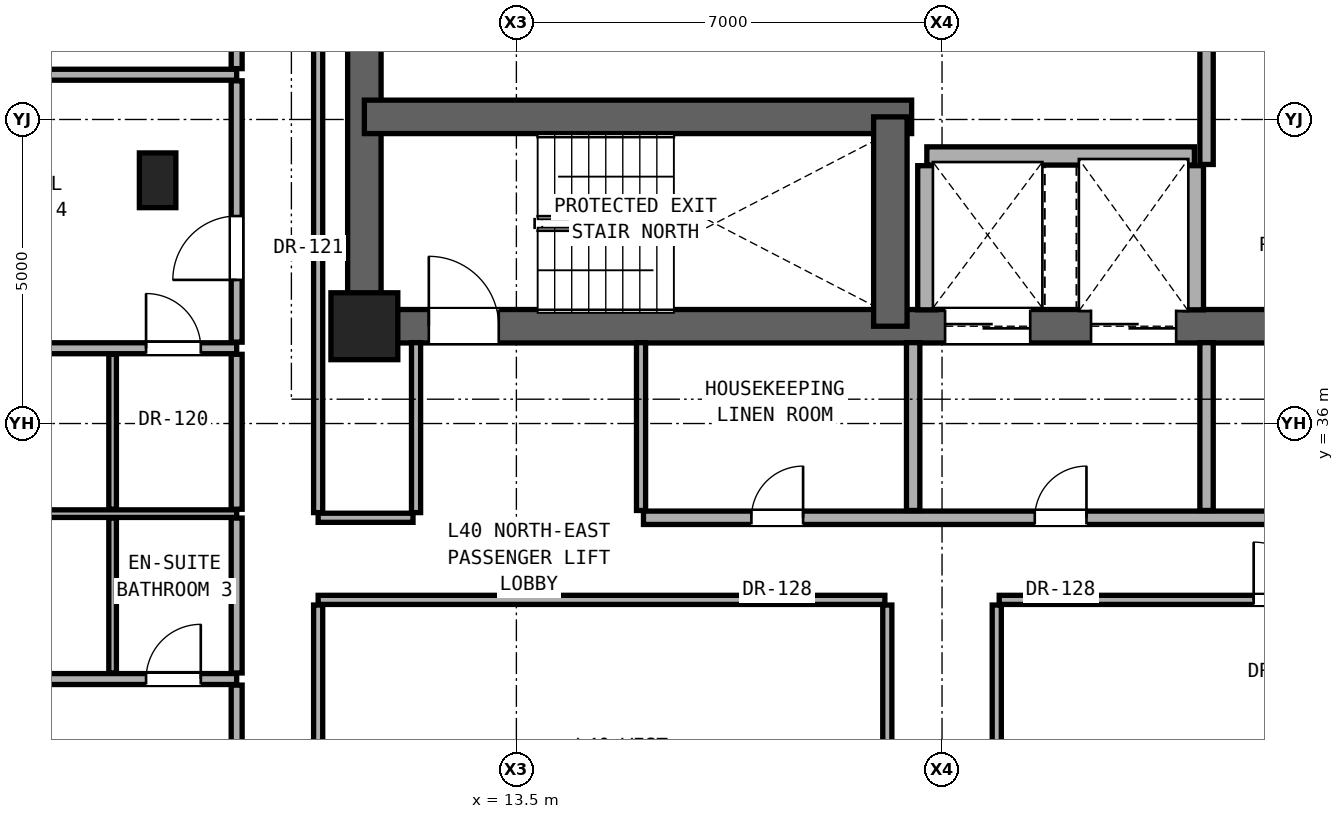
"""IFC4 building model, lengths in metres.
Left out: names, types, materials, properties, quantities, classifications, styles, units other than length and angle.
Written with IfcOpenShell. Run it as: python <this file> out.ifc"""

import sys

from ifc_helpers import new_model, si_unit, direction, frame, frame_2d, origin, origin_2d, place, context, subcontext, project, spatial, rectangle, extrude, element, fill, save


model = new_model("IFC4")
c1 = context("Model", 3, precision=1e-05, world=origin(), true_north=direction((0.0, 1.0)))
c2 = subcontext(c1, "Body", "Model", "MODEL_VIEW")
j1 = project(units=[si_unit("LENGTHUNIT", "METRE"), si_unit("PLANEANGLEUNIT", "RADIAN")], contexts=[c1])
p1 = place(None, origin())
s1 = spatial("IfcSite", under=j1, at=p1, CompositionType="ELEMENT")
p2 = place(p1, origin())
s2 = spatial("IfcBuilding", under=s1, at=p2, CompositionType="ELEMENT")
p3 = place(p2, frame((0.0, 0.0, 141.2)))
s3 = spatial("IfcBuildingStorey", under=s2, at=p3, CompositionType="ELEMENT", Elevation=141.2)
p4 = place(p3, frame((11.0, 37.6, 0.0), z_axis=(0.0, 0.0, 1.0), x_axis=(1.0, 0.0, 0.0)))
e1 = element("IfcColumn", 1, at=p4, inside=s3, PredefinedType="COLUMN", context=c2, shape_type="SweptSolid", body=[
    extrude(rectangle(XDim=1.1, YDim=1.1, at=origin_2d()), origin(), (0.0, 0.0, 1.0), 3.3),
])
p5 = place(p3, frame((7.6, 40.0, 0.0), z_axis=(0.0, 0.0, 1.0), x_axis=(1.0, 0.0, 0.0)))
e2 = element("IfcColumn", 2, at=p5, inside=s3, PredefinedType="PILASTER", context=c2, shape_type="SweptSolid", body=[
    extrude(rectangle(XDim=0.6, YDim=0.9, at=origin_2d()), origin(), (0.0, 0.0, 1.0), 3.3),
])
p6 = place(p3, frame((11.0, 37.6, 0.0), z_axis=(0.0, 0.0, 1.0), x_axis=(0.0, 1.0, 0.0)))
e3 = element("IfcWall", 3, at=p6, inside=s3, PredefinedType="SHEAR", context=c2, shape_type="SweptSolid", body=[
    extrude(rectangle(XDim=6.0, YDim=0.55, at=frame_2d((3.0, 0.0))), origin(), (0.0, 0.0, 1.0), 3.08),
])
p7 = place(p3, frame((11.0, 37.6, 0.0), z_axis=(0.0, 0.0, 1.0), x_axis=(1.0, 0.0, 0.0)))
e4 = element("IfcWall", 4, at=p7, inside=s3, PredefinedType="SHEAR", context=c2, shape_type="SweptSolid", body=[
    extrude(rectangle(XDim=19.0, YDim=0.55, at=frame_2d((9.5, 0.0))), origin(), (0.0, 0.0, 1.0), 3.08),
])
p8 = place(p7, frame((1.06, 0.0, 0.0)))
e5 = element("IfcOpeningElement", 5, at=p8, cuts=e4, PredefinedType="OPENING", context=c2, shape_type="SweptSolid", body=[
    extrude(rectangle(XDim=1.15, YDim=2.2, at=frame_2d((0.575, 1.1))), frame((0.0, 0.285, 0.0), z_axis=(0.0, -1.0, 0.0), x_axis=(1.0, 0.0, 0.0)), (0.0, 0.0, 1.0), 0.57),
])
p9 = place(p7, frame((9.55, 0.0, 0.0)))
e6 = element("IfcOpeningElement", 6, at=p9, cuts=e4, PredefinedType="OPENING", context=c2, shape_type="SweptSolid", body=[
    extrude(rectangle(XDim=1.4, YDim=2.35, at=frame_2d((0.7, 1.175))), frame((0.0, 0.285, 0.0), z_axis=(0.0, -1.0, 0.0), x_axis=(1.0, 0.0, 0.0)), (0.0, 0.0, 1.0), 0.57),
])
p10 = place(p7, frame((11.95, 0.0, 0.0)))
e7 = element("IfcOpeningElement", 7, at=p10, cuts=e4, PredefinedType="OPENING", context=c2, shape_type="SweptSolid", body=[
    extrude(rectangle(XDim=1.4, YDim=2.35, at=frame_2d((0.7, 1.175))), frame((0.0, 0.285, 0.0), z_axis=(0.0, -1.0, 0.0), x_axis=(1.0, 0.0, 0.0)), (0.0, 0.0, 1.0), 0.57),
])
p11 = place(p3, frame((11.0, 41.043, 0.0), z_axis=(0.0, 0.0, 1.0), x_axis=(1.0, 0.0, 0.0)))
e8 = element("IfcWall", 8, at=p11, inside=s3, PredefinedType="SHEAR", context=c2, shape_type="SweptSolid", body=[
    extrude(rectangle(XDim=9.0, YDim=0.55, at=frame_2d((4.5, 0.0))), origin(), (0.0, 0.0, 1.0), 3.08),
])
p12 = place(p3, frame((19.65, 37.6, 0.0), z_axis=(0.0, 0.0, 1.0), x_axis=(0.0, 1.0, 0.0)))
e9 = element("IfcWall", 9, at=p12, inside=s3, PredefinedType="SHEAR", context=c2, shape_type="SweptSolid", body=[
    extrude(rectangle(XDim=3.443, YDim=0.55, at=frame_2d((1.721, 0.0))), origin(), (0.0, 0.0, 1.0), 3.08),
])
p13 = place(p3, frame((-1.34, 31.798, 0.0), z_axis=(0.0, 0.0, 1.0), x_axis=(1.0, 0.0, 0.0)))
e10 = element("IfcWall", 10, at=p13, inside=s3, PredefinedType="PARTITIONING", context=c2, shape_type="SweptSolid", body=[
    extrude(rectangle(XDim=10.24, YDim=0.18, at=frame_2d((5.12, 0.0))), origin(), (0.0, 0.0, 1.0), 2.299),
])
p14 = place(p13, frame((4.245, 0.0, 0.0)))
e11 = element("IfcOpeningElement", 11, at=p14, cuts=e10, PredefinedType="OPENING", context=c2, shape_type="SweptSolid", body=[
    extrude(rectangle(XDim=0.95, YDim=2.15, at=frame_2d((0.475, 1.075))), frame((0.0, 0.1, 0.0), z_axis=(0.0, -1.0, 0.0), x_axis=(1.0, 0.0, 0.0)), (0.0, 0.0, 1.0), 0.2),
])
p15 = place(p13, frame((8.75, 0.0, 0.0)))
e12 = element("IfcOpeningElement", 12, at=p15, cuts=e10, PredefinedType="OPENING", context=c2, shape_type="SweptSolid", body=[
    extrude(rectangle(XDim=0.9, YDim=2.1, at=frame_2d((0.45, 1.05))), frame((0.0, 0.1, 0.0), z_axis=(0.0, -1.0, 0.0), x_axis=(1.0, 0.0, 0.0)), (0.0, 0.0, 1.0), 0.2),
])
p16 = place(p3, frame((10.24, 33.1, 0.0), z_axis=(0.0, 0.0, 1.0), x_axis=(1.0, 0.0, 0.0)))
e13 = element("IfcWall", 13, at=p16, inside=s3, PredefinedType="PARTITIONING", context=c2, shape_type="SweptSolid", body=[
    extrude(rectangle(XDim=9.32, YDim=0.15, at=frame_2d((4.66, 0.0))), origin(), (0.0, 0.0, 1.0), 2.216),
])
p17 = place(p3, frame((21.44, 33.1, 0.0), z_axis=(0.0, 0.0, 1.0), x_axis=(1.0, 0.0, 0.0)))
e14 = element("IfcWall", 14, at=p17, inside=s3, PredefinedType="PARTITIONING", context=c2, shape_type="SweptSolid", body=[
    extrude(rectangle(XDim=9.32, YDim=0.15, at=frame_2d((4.66, 0.0))), origin(), (0.0, 0.0, 1.0), 2.216),
])
p18 = place(p17, frame((4.185, 0.0, 0.0)))
e15 = element("IfcOpeningElement", 15, at=p18, cuts=e14, PredefinedType="OPENING", context=c2, shape_type="SweptSolid", body=[
    extrude(rectangle(XDim=0.95, YDim=2.15, at=frame_2d((0.475, 1.075))), frame((0.0, 0.085, 0.0), z_axis=(0.0, -1.0, 0.0), x_axis=(1.0, 0.0, 0.0)), (0.0, 0.0, 1.0), 0.17),
])
p19 = place(p3, frame((-1.34, 34.518, 0.0), z_axis=(0.0, 0.0, 1.0), x_axis=(1.0, 0.0, 0.0)))
e16 = element("IfcWall", 16, at=p19, inside=s3, PredefinedType="PARTITIONING", context=c2, shape_type="SweptSolid", body=[
    extrude(rectangle(XDim=10.24, YDim=0.125, at=frame_2d((5.12, 0.0))), origin(), (0.0, 0.0, 1.0), 2.299),
])
p20 = place(p3, frame((10.24, 34.45, 0.0), z_axis=(0.0, 0.0, 1.0), x_axis=(1.0, 0.0, 0.0)))
e17 = element("IfcWall", 17, at=p20, inside=s3, PredefinedType="PARTITIONING", context=c2, shape_type="SweptSolid", body=[
    extrude(rectangle(XDim=1.56, YDim=0.15, at=frame_2d((0.78, 0.0))), origin(), (0.0, 0.0, 1.0), 2.216),
])
p21 = place(p3, frame((15.59, 34.45, 0.0), z_axis=(0.0, 0.0, 1.0), x_axis=(1.0, 0.0, 0.0)))
e18 = element("IfcWall", 18, at=p21, inside=s3, PredefinedType="SOLIDWALL", context=c2, shape_type="SweptSolid", body=[
    extrude(rectangle(XDim=15.17, YDim=0.22, at=frame_2d((7.585, 0.0))), origin(), (0.0, 0.0, 1.0), 2.216),
])
p22 = place(p21, frame((6.435, 0.0, 0.0)))
e19 = element("IfcOpeningElement", 19, at=p22, cuts=e18, PredefinedType="OPENING", context=c2, shape_type="SweptSolid", body=[
    extrude(rectangle(XDim=0.85, YDim=2.01, at=frame_2d((0.425, 1.005))), frame((0.0, 0.12, 0.0), z_axis=(0.0, -1.0, 0.0), x_axis=(1.0, 0.0, 0.0)), (0.0, 0.0, 1.0), 0.24),
])
p23 = place(p21, frame((11.085, 0.0, 0.0)))
e20 = element("IfcOpeningElement", 20, at=p23, cuts=e18, PredefinedType="OPENING", context=c2, shape_type="SweptSolid", body=[
    extrude(rectangle(XDim=0.95, YDim=2.15, at=frame_2d((0.475, 1.075))), frame((0.0, 0.12, 0.0), z_axis=(0.0, -1.0, 0.0), x_axis=(1.0, 0.0, 0.0)), (0.0, 0.0, 1.0), 0.24),
])
p24 = place(p21, frame((1.775, 0.0, 0.0)))
e21 = element("IfcOpeningElement", 21, at=p24, cuts=e18, PredefinedType="OPENING", context=c2, shape_type="SweptSolid", body=[
    extrude(rectangle(XDim=0.85, YDim=2.01, at=frame_2d((0.425, 1.005))), frame((0.0, 0.12, 0.0), z_axis=(0.0, -1.0, 0.0), x_axis=(1.0, 0.0, 0.0)), (0.0, 0.0, 1.0), 0.24),
])
p25 = place(p3, frame((-1.34, 37.238, 0.0), z_axis=(0.0, 0.0, 1.0), x_axis=(1.0, 0.0, 0.0)))
e22 = element("IfcWall", 22, at=p25, inside=s3, PredefinedType="PARTITIONING", context=c2, shape_type="SweptSolid", body=[
    extrude(rectangle(XDim=10.24, YDim=0.18, at=frame_2d((5.12, 0.0))), origin(), (0.0, 0.0, 1.0), 2.299),
])
p26 = place(p25, frame((4.245, 0.0, 0.0)))
e23 = element("IfcOpeningElement", 23, at=p26, cuts=e22, PredefinedType="OPENING", context=c2, shape_type="SweptSolid", body=[
    extrude(rectangle(XDim=0.95, YDim=2.15, at=frame_2d((0.475, 1.075))), frame((0.0, 0.1, 0.0), z_axis=(0.0, -1.0, 0.0), x_axis=(1.0, 0.0, 0.0)), (0.0, 0.0, 1.0), 0.2),
])
p27 = place(p25, frame((8.75, 0.0, 0.0)))
e24 = element("IfcOpeningElement", 24, at=p27, cuts=e22, PredefinedType="OPENING", context=c2, shape_type="SweptSolid", body=[
    extrude(rectangle(XDim=0.9, YDim=2.1, at=frame_2d((0.45, 1.05))), frame((0.0, 0.1, 0.0), z_axis=(0.0, -1.0, 0.0), x_axis=(1.0, 0.0, 0.0)), (0.0, 0.0, 1.0), 0.2),
])
p28 = place(p3, frame((20.25, 40.4, 0.0), z_axis=(0.0, 0.0, 1.0), x_axis=(1.0, 0.0, 0.0)))
e25 = element("IfcWall", 25, at=p28, inside=s3, PredefinedType="SOLIDWALL", context=c2, shape_type="SweptSolid", body=[
    extrude(rectangle(XDim=4.4, YDim=0.3, at=frame_2d((2.2, 0.0))), origin(), (0.0, 0.0, 1.0), 3.08),
])
p29 = place(p3, frame((3.95, 41.736, 0.0), z_axis=(0.0, 0.0, 1.0), x_axis=(1.0, 0.0, 0.0)))
e26 = element("IfcWall", 26, at=p29, inside=s3, PredefinedType="PARTITIONING", context=c2, shape_type="SweptSolid", body=[
    extrude(rectangle(XDim=4.95, YDim=0.18, at=frame_2d((2.475, 0.0))), origin(), (0.0, 0.0, 1.0), 3.08),
])
p30 = place(p3, frame((6.86, 31.898, 0.0), z_axis=(0.0, 0.0, 1.0), x_axis=(0.0, 1.0, 0.0)))
e27 = element("IfcWall", 27, at=p30, inside=s3, PredefinedType="PARTITIONING", context=c2, shape_type="SweptSolid", body=[
    extrude(rectangle(XDim=2.548, YDim=0.125, at=frame_2d((1.274, 0.0))), origin(), (0.0, 0.0, 1.0), 3.08),
])
p31 = place(p3, frame((6.86, 34.591, 0.0), z_axis=(0.0, 0.0, 1.0), x_axis=(0.0, 1.0, 0.0)))
e28 = element("IfcWall", 28, at=p31, inside=s3, PredefinedType="PARTITIONING", context=c2, shape_type="SweptSolid", body=[
    extrude(rectangle(XDim=2.547, YDim=0.125, at=frame_2d((1.274, 0.0))), origin(), (0.0, 0.0, 1.0), 3.08),
])
p32 = place(p3, frame((8.9, 27.908, 0.0), z_axis=(0.0, 0.0, 1.0), x_axis=(0.0, 1.0, 0.0)))
e29 = element("IfcWall", 29, at=p32, inside=s3, PredefinedType="PARTITIONING", context=c2, shape_type="SweptSolid", body=[
    extrude(rectangle(XDim=3.79, YDim=0.18, at=frame_2d((1.895, 0.0))), origin(), (0.0, 0.0, 1.0), 2.299),
])
p33 = place(p32, frame((1.37, 0.0, 0.0)))
e30 = element("IfcOpeningElement", 30, at=p33, cuts=e29, PredefinedType="OPENING", context=c2, shape_type="SweptSolid", body=[
    extrude(rectangle(XDim=1.05, YDim=2.2, at=frame_2d((0.525, 1.1))), frame((0.0, 0.1, 0.0), z_axis=(0.0, -1.0, 0.0), x_axis=(1.0, 0.0, 0.0)), (0.0, 0.0, 1.0), 0.2),
])
p34 = place(p3, frame((8.9, 31.898, 0.0), z_axis=(0.0, 0.0, 1.0), x_axis=(0.0, 1.0, 0.0)))
e31 = element("IfcWall", 31, at=p34, inside=s3, PredefinedType="PARTITIONING", context=c2, shape_type="SweptSolid", body=[
    extrude(rectangle(XDim=2.548, YDim=0.18, at=frame_2d((1.274, 0.0))), origin(), (0.0, 0.0, 1.0), 3.08),
])
p35 = place(p3, frame((8.9, 34.591, 0.0), z_axis=(0.0, 0.0, 1.0), x_axis=(0.0, 1.0, 0.0)))
e32 = element("IfcWall", 32, at=p35, inside=s3, PredefinedType="PARTITIONING", context=c2, shape_type="SweptSolid", body=[
    extrude(rectangle(XDim=2.547, YDim=0.18, at=frame_2d((1.274, 0.0))), origin(), (0.0, 0.0, 1.0), 3.08),
])
p36 = place(p3, frame((8.9, 37.338, 0.0), z_axis=(0.0, 0.0, 1.0), x_axis=(0.0, 1.0, 0.0)))
e33 = element("IfcWall", 33, at=p36, inside=s3, PredefinedType="PARTITIONING", context=c2, shape_type="SweptSolid", body=[
    extrude(rectangle(XDim=4.298, YDim=0.18, at=frame_2d((2.149, 0.0))), origin(), (0.0, 0.0, 1.0), 2.456),
])
p37 = place(p36, frame((1.024, 0.0, 0.0)))
e34 = element("IfcOpeningElement", 34, at=p37, cuts=e33, PredefinedType="OPENING", context=c2, shape_type="SweptSolid", body=[
    extrude(rectangle(XDim=1.05, YDim=2.2, at=frame_2d((0.525, 1.1))), frame((0.0, 0.1, 0.0), z_axis=(0.0, -1.0, 0.0), x_axis=(1.0, 0.0, 0.0)), (0.0, 0.0, 1.0), 0.2),
])
p38 = place(p3, frame((8.9, 41.836, 0.0), z_axis=(0.0, 0.0, 1.0), x_axis=(0.0, 1.0, 0.0)))
e35 = element("IfcWall", 35, at=p38, inside=s3, PredefinedType="PARTITIONING", context=c2, shape_type="SweptSolid", body=[
    extrude(rectangle(XDim=5.17, YDim=0.18, at=frame_2d((2.585, 0.0))), origin(), (0.0, 0.0, 1.0), 3.08),
])
p39 = place(p38, frame((2.11, 0.0, 0.0)))
e36 = element("IfcOpeningElement", 36, at=p39, cuts=e35, PredefinedType="OPENING", context=c2, shape_type="SweptSolid", body=[
    extrude(rectangle(XDim=0.95, YDim=2.15, at=frame_2d((0.475, 1.075))), frame((0.0, 0.1, 0.0), z_axis=(0.0, -1.0, 0.0), x_axis=(1.0, 0.0, 0.0)), (0.0, 0.0, 1.0), 0.2),
])
p40 = place(p3, frame((10.24, 27.485, 0.0), z_axis=(0.0, 0.0, 1.0), x_axis=(0.0, 1.0, 0.0)))
e37 = element("IfcWall", 37, at=p40, inside=s3, PredefinedType="PARTITIONING", context=c2, shape_type="SweptSolid", body=[
    extrude(rectangle(XDim=5.53, YDim=0.15, at=frame_2d((2.765, 0.0))), origin(), (0.0, 0.0, 1.0), 2.299),
])
p41 = place(p40, frame((2.29, 0.0, 0.0)))
e38 = element("IfcOpeningElement", 38, at=p41, cuts=e37, PredefinedType="OPENING", context=c2, shape_type="SweptSolid", body=[
    extrude(rectangle(XDim=0.95, YDim=2.15, at=frame_2d((0.475, 1.075))), frame((0.0, 0.085, 0.0), z_axis=(0.0, -1.0, 0.0), x_axis=(1.0, 0.0, 0.0)), (0.0, 0.0, 1.0), 0.17),
])
p42 = place(p3, frame((10.24, 34.535, 0.0), z_axis=(0.0, 0.0, 1.0), x_axis=(0.0, 1.0, 0.0)))
e39 = element("IfcWall", 39, at=p42, inside=s3, PredefinedType="PARTITIONING", context=c2, shape_type="SweptSolid", body=[
    extrude(rectangle(XDim=9.13, YDim=0.15, at=frame_2d((4.565, 0.0))), origin(), (0.0, 0.0, 1.0), 2.456),
])
p43 = place(p3, frame((11.85, 34.535, 0.0), z_axis=(0.0, 0.0, 1.0), x_axis=(0.0, 1.0, 0.0)))
e40 = element("IfcWall", 40, at=p43, inside=s3, PredefinedType="PARTITIONING", context=c2, shape_type="SweptSolid", body=[
    extrude(rectangle(XDim=2.795, YDim=0.15, at=frame_2d((1.397, 0.0))), origin(), (0.0, 0.0, 1.0), 3.08),
])
p44 = place(p3, frame((15.55, 34.57, 0.0), z_axis=(0.0, 0.0, 1.0), x_axis=(0.0, 1.0, 0.0)))
e41 = element("IfcWall", 41, at=p44, inside=s3, PredefinedType="PARTITIONING", context=c2, shape_type="SweptSolid", body=[
    extrude(rectangle(XDim=2.76, YDim=0.15, at=frame_2d((1.38, 0.0))), origin(), (0.0, 0.0, 1.0), 2.609),
])
p45 = place(p3, frame((19.6, 27.485, 0.0), z_axis=(0.0, 0.0, 1.0), x_axis=(0.0, 1.0, 0.0)))
e42 = element("IfcWall", 42, at=p45, inside=s3, PredefinedType="PARTITIONING", context=c2, shape_type="SweptSolid", body=[
    extrude(rectangle(XDim=5.53, YDim=0.15, at=frame_2d((2.765, 0.0))), origin(), (0.0, 0.0, 1.0), 2.216),
])
p46 = place(p3, frame((20.025, 34.57, 0.0), z_axis=(0.0, 0.0, 1.0), x_axis=(0.0, 1.0, 0.0)))
e43 = element("IfcWall", 43, at=p46, inside=s3, PredefinedType="SOLIDWALL", context=c2, shape_type="SweptSolid", body=[
    extrude(rectangle(XDim=2.76, YDim=0.22, at=frame_2d((1.38, 0.0))), origin(), (0.0, 0.0, 1.0), 3.08),
])
p47 = place(p3, frame((20.25, 37.87, 0.0), z_axis=(0.0, 0.0, 1.0), x_axis=(0.0, 1.0, 0.0)))
e44 = element("IfcWall", 44, at=p47, inside=s3, PredefinedType="SOLIDWALL", context=c2, shape_type="SweptSolid", body=[
    extrude(rectangle(XDim=2.37, YDim=0.3, at=frame_2d((1.185, 0.0))), origin(), (0.0, 0.0, 1.0), 3.08),
])
p48 = place(p3, frame((21.4, 27.485, 0.0), z_axis=(0.0, 0.0, 1.0), x_axis=(0.0, 1.0, 0.0)))
e45 = element("IfcWall", 45, at=p48, inside=s3, PredefinedType="PARTITIONING", context=c2, shape_type="SweptSolid", body=[
    extrude(rectangle(XDim=5.53, YDim=0.15, at=frame_2d((2.765, 0.0))), origin(), (0.0, 0.0, 1.0), 2.216),
])
p49 = place(p3, frame((24.65, 37.87, 0.0), z_axis=(0.0, 0.0, 1.0), x_axis=(0.0, 1.0, 0.0)))
e46 = element("IfcWall", 46, at=p49, inside=s3, PredefinedType="SOLIDWALL", context=c2, shape_type="SweptSolid", body=[
    extrude(rectangle(XDim=2.37, YDim=0.3, at=frame_2d((1.185, 0.0))), origin(), (0.0, 0.0, 1.0), 3.08),
])
p50 = place(p3, frame((24.85, 34.57, 0.0), z_axis=(0.0, 0.0, 1.0), x_axis=(0.0, 1.0, 0.0)))
e47 = element("IfcWall", 47, at=p50, inside=s3, PredefinedType="SOLIDWALL", context=c2, shape_type="SweptSolid", body=[
    extrude(rectangle(XDim=2.76, YDim=0.22, at=frame_2d((1.38, 0.0))), origin(), (0.0, 0.0, 1.0), 3.08),
])
p51 = place(p3, frame((24.85, 40.26, 0.0), z_axis=(0.0, 0.0, 1.0), x_axis=(0.0, 1.0, 0.0)))
e48 = element("IfcWall", 48, at=p51, inside=s3, PredefinedType="SOLIDWALL", context=c2, shape_type="SweptSolid", body=[
    extrude(rectangle(XDim=2.94, YDim=0.22, at=frame_2d((1.47, 0.0))), origin(), (0.0, 0.0, 1.0), 3.08),
])
p52 = place(p8, origin())
e49 = element("IfcDoor", 49, at=p52, inside=s3, OperationType="SINGLE_SWING_LEFT", PredefinedType="DOOR", context=c2, shape_type="SweptSolid", body=[
    extrude(rectangle(XDim=1.15, YDim=2.2, at=frame_2d((0.575, 1.1))), frame((0.0, 0.025, 0.0), z_axis=(0.0, -1.0, 0.0), x_axis=(1.0, 0.0, 0.0)), (0.0, 0.0, 1.0), 0.05),
])
fill(e5, e49)
p53 = place(p22, origin())
e50 = element("IfcDoor", 50, at=p53, inside=s3, OperationType="SINGLE_SWING_RIGHT", PredefinedType="DOOR", context=c2, shape_type="SweptSolid", body=[
    extrude(rectangle(XDim=0.85, YDim=2.01, at=frame_2d((0.425, 1.005))), frame((0.0, 0.025, 0.0), z_axis=(0.0, -1.0, 0.0), x_axis=(1.0, 0.0, 0.0)), (0.0, 0.0, 1.0), 0.05),
])
fill(e19, e50)
p54 = place(p24, origin())
e51 = element("IfcDoor", 51, at=p54, inside=s3, OperationType="SINGLE_SWING_RIGHT", PredefinedType="DOOR", context=c2, shape_type="SweptSolid", body=[
    extrude(rectangle(XDim=0.85, YDim=2.01, at=frame_2d((0.425, 1.005))), frame((0.0, 0.025, 0.0), z_axis=(0.0, -1.0, 0.0), x_axis=(1.0, 0.0, 0.0)), (0.0, 0.0, 1.0), 0.05),
])
fill(e21, e51)
p55 = place(p15, origin())
e52 = element("IfcDoor", 52, at=p55, inside=s3, OperationType="SINGLE_SWING_RIGHT", PredefinedType="DOOR", context=c2, shape_type="SweptSolid", body=[
    extrude(rectangle(XDim=0.9, YDim=2.1, at=frame_2d((0.45, 1.05))), frame((0.0, 0.025, 0.0), z_axis=(0.0, -1.0, 0.0), x_axis=(1.0, 0.0, 0.0)), (0.0, 0.0, 1.0), 0.05),
])
fill(e12, e52)
p56 = place(p37, origin())
e53 = element("IfcDoor", 53, at=p56, inside=s3, OperationType="SINGLE_SWING_LEFT", PredefinedType="DOOR", context=c2, shape_type="SweptSolid", body=[
    extrude(rectangle(XDim=1.05, YDim=2.2, at=frame_2d((0.525, 1.1))), frame((0.0, 0.025, 0.0), z_axis=(0.0, -1.0, 0.0), x_axis=(1.0, 0.0, 0.0)), (0.0, 0.0, 1.0), 0.05),
])
fill(e34, e53)
p57 = place(p27, origin())
e54 = element("IfcDoor", 54, at=p57, inside=s3, OperationType="SINGLE_SWING_LEFT", PredefinedType="DOOR", context=c2, shape_type="SweptSolid", body=[
    extrude(rectangle(XDim=0.9, YDim=2.1, at=frame_2d((0.45, 1.05))), frame((0.0, 0.025, 0.0), z_axis=(0.0, -1.0, 0.0), x_axis=(1.0, 0.0, 0.0)), (0.0, 0.0, 1.0), 0.05),
])
fill(e24, e54)
p58 = place(p18, origin())
e55 = element("IfcDoor", 55, at=p58, inside=s3, OperationType="SINGLE_SWING_LEFT", PredefinedType="DOOR", context=c2, shape_type="SweptSolid", body=[
    extrude(rectangle(XDim=0.95, YDim=2.15, at=frame_2d((0.475, 1.075))), frame((0.0, 0.025, 0.0), z_axis=(0.0, -1.0, 0.0), x_axis=(1.0, 0.0, 0.0)), (0.0, 0.0, 1.0), 0.05),
])
fill(e15, e55)
p59 = place(p9, origin())
e56 = element("IfcDoor", 56, at=p59, inside=s3, OperationType="DOUBLE_DOOR_SLIDING", PredefinedType="DOOR", context=c2, shape_type="SweptSolid", body=[
    extrude(rectangle(XDim=1.4, YDim=2.35, at=frame_2d((0.7, 1.175))), frame((0.0, 0.025, 0.0), z_axis=(0.0, -1.0, 0.0), x_axis=(1.0, 0.0, 0.0)), (0.0, 0.0, 1.0), 0.05),
])
fill(e6, e56)
p60 = place(p10, origin())
e57 = element("IfcDoor", 57, at=p60, inside=s3, OperationType="DOUBLE_DOOR_SLIDING", PredefinedType="DOOR", context=c2, shape_type="SweptSolid", body=[
    extrude(rectangle(XDim=1.4, YDim=2.35, at=frame_2d((0.7, 1.175))), frame((0.0, 0.025, 0.0), z_axis=(0.0, -1.0, 0.0), x_axis=(1.0, 0.0, 0.0)), (0.0, 0.0, 1.0), 0.05),
])
fill(e7, e57)
save(model, sys.argv[1])
